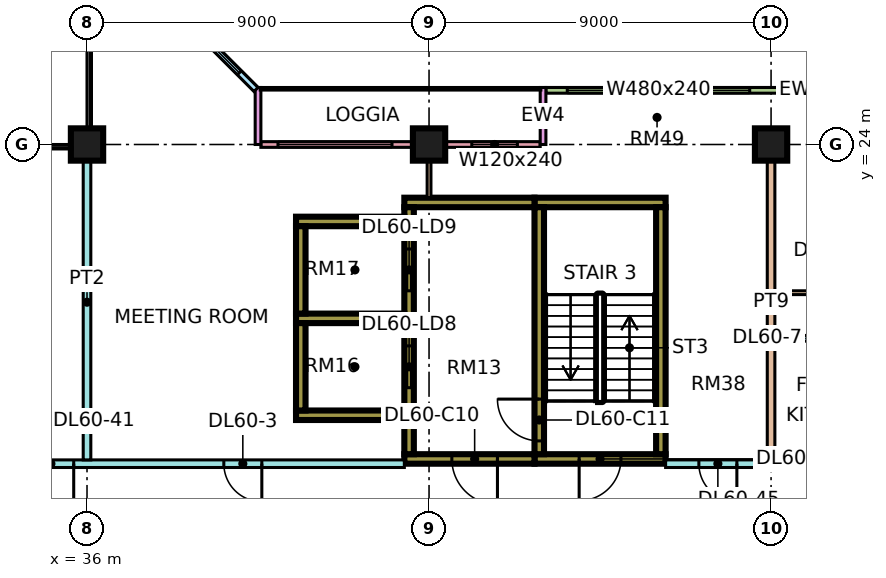
"""IFC4 building model, lengths in metres.
Left out: names, types, materials, properties, quantities, classifications, styles, units other than length and angle.
Written with IfcOpenShell. Run it as: python <this file> out.ifc"""

import sys

from ifc_helpers import new_model, si_unit, direction, frame, frame_2d, origin, origin_2d, place, context, subcontext, project, spatial, rectangle, extrude, element, fill, save


model = new_model("IFC4")
c1 = context("Model", 3, precision=1e-05, world=origin(), true_north=direction((0.0, 1.0)))
c2 = subcontext(c1, "Body", "Model", "MODEL_VIEW")
j1 = project(units=[si_unit("LENGTHUNIT", "METRE"), si_unit("PLANEANGLEUNIT", "RADIAN")], contexts=[c1])
p1 = place(None, origin())
s1 = spatial("IfcSite", under=j1, at=p1, CompositionType="ELEMENT")
p2 = place(p1, origin())
s2 = spatial("IfcBuilding", under=s1, at=p2, CompositionType="ELEMENT")
p3 = place(p2, frame((0.0, 0.0, 252.9)))
s3 = spatial("IfcBuildingStorey", under=s2, at=p3, CompositionType="ELEMENT", Elevation=252.9)
for number, where, z_axis, x_axis in (
    (1, (36.0, 24.0, 0.0), (0.0, 0.0, 1.0), (1.0, 0.0, 0.0)),
    (2, (45.0, 24.0, 0.0), (0.0, 0.0, 1.0), (1.0, 0.0, 0.0)),
    (3, (54.0, 24.0, 0.0), (0.0, 0.0, 1.0), (1.0, 0.0, 0.0)),
):
    element("IfcColumn", number, at=place(p3, frame(where, z_axis=z_axis, x_axis=x_axis)), inside=s3, PredefinedType="COLUMN", context=c2, shape_type="SweptSolid", body=[
        extrude(rectangle(XDim=0.85, YDim=0.85, at=origin_2d()), origin(), (0.0, 0.0, 1.0), 3.75),
    ])
p4 = place(p3, frame((47.775, 15.725, 0.0), z_axis=(0.0, 0.0, 1.0), x_axis=(1.0, 0.0, 0.0)))
e4 = element("IfcWall", 4, at=p4, inside=s3, PredefinedType="SHEAR", context=c2, shape_type="SweptSolid", body=[
    extrude(rectangle(XDim=3.45, YDim=0.25, at=frame_2d((1.725, 0.0))), origin(), (0.0, 0.0, 1.0), 3.75),
])
p5 = place(p4, frame((1.175, 0.0, 0.0)))
e5 = element("IfcOpeningElement", 5, at=p5, cuts=e4, PredefinedType="OPENING", context=c2, shape_type="SweptSolid", body=[
    extrude(rectangle(XDim=1.1, YDim=2.2, at=frame_2d((0.55, 1.1))), frame((0.0, 0.135, 0.0), z_axis=(0.0, -1.0, 0.0), x_axis=(1.0, 0.0, 0.0)), (0.0, 0.0, 1.0), 0.27),
])
p6 = place(p3, frame((47.775, 22.475, 0.0), z_axis=(0.0, 0.0, 1.0), x_axis=(1.0, 0.0, 0.0)))
e6 = element("IfcWall", 6, at=p6, inside=s3, PredefinedType="SHEAR", context=c2, shape_type="SweptSolid", body=[
    extrude(rectangle(XDim=3.45, YDim=0.25, at=frame_2d((1.725, 0.0))), origin(), (0.0, 0.0, 1.0), 3.75),
])
p7 = place(p3, frame((47.9, 15.85, 0.0), z_axis=(0.0, 0.0, 1.0), x_axis=(0.0, 1.0, 0.0)))
e7 = element("IfcWall", 7, at=p7, inside=s3, PredefinedType="SHEAR", context=c2, shape_type="SweptSolid", body=[
    extrude(rectangle(XDim=6.5, YDim=0.25, at=frame_2d((3.25, 0.0))), origin(), (0.0, 0.0, 1.0), 3.75),
])
p8 = place(p7, frame((0.35, 0.0, 0.0)))
e8 = element("IfcOpeningElement", 8, at=p8, cuts=e7, PredefinedType="OPENING", context=c2, shape_type="SweptSolid", body=[
    extrude(rectangle(XDim=1.1, YDim=2.2, at=frame_2d((0.55, 1.1))), frame((0.0, 0.135, 0.0), z_axis=(0.0, -1.0, 0.0), x_axis=(1.0, 0.0, 0.0)), (0.0, 0.0, 1.0), 0.27),
])
p9 = place(p3, frame((51.1, 15.85, 0.0), z_axis=(0.0, 0.0, 1.0), x_axis=(0.0, 1.0, 0.0)))
e9 = element("IfcWall", 9, at=p9, inside=s3, PredefinedType="SHEAR", context=c2, shape_type="SweptSolid", body=[
    extrude(rectangle(XDim=6.5, YDim=0.25, at=frame_2d((3.25, 0.0))), origin(), (0.0, 0.0, 1.0), 3.75),
])
p10 = place(p3, frame((44.35, 15.725, 0.0), z_axis=(0.0, 0.0, 1.0), x_axis=(1.0, 0.0, 0.0)))
e10 = element("IfcWall", 10, at=p10, inside=s3, PredefinedType="SHEAR", context=c2, shape_type="SweptSolid", body=[
    extrude(rectangle(XDim=3.425, YDim=0.25, at=frame_2d((1.712, 0.0))), origin(), (0.0, 0.0, 1.0), 3.75),
])
p11 = place(p10, frame((1.25, 0.0, 0.0)))
e11 = element("IfcOpeningElement", 11, at=p11, cuts=e10, PredefinedType="OPENING", context=c2, shape_type="SweptSolid", body=[
    extrude(rectangle(XDim=1.2, YDim=2.2, at=frame_2d((0.6, 1.1))), frame((0.0, 0.135, 0.0), z_axis=(0.0, -1.0, 0.0), x_axis=(1.0, 0.0, 0.0)), (0.0, 0.0, 1.0), 0.27),
])
p12 = place(p3, frame((44.35, 22.475, 0.0), z_axis=(0.0, 0.0, 1.0), x_axis=(1.0, 0.0, 0.0)))
e12 = element("IfcWall", 12, at=p12, inside=s3, PredefinedType="SHEAR", context=c2, shape_type="SweptSolid", body=[
    extrude(rectangle(XDim=3.425, YDim=0.25, at=frame_2d((1.712, 0.0))), origin(), (0.0, 0.0, 1.0), 3.75),
])
p13 = place(p3, frame((44.475, 15.85, 0.0), z_axis=(0.0, 0.0, 1.0), x_axis=(0.0, 1.0, 0.0)))
e13 = element("IfcWall", 13, at=p13, inside=s3, PredefinedType="SHEAR", context=c2, shape_type="SweptSolid", body=[
    extrude(rectangle(XDim=6.5, YDim=0.25, at=frame_2d((3.25, 0.0))), origin(), (0.0, 0.0, 1.0), 3.75),
])
p14 = place(p13, frame((1.75, 0.0, 0.0)))
e14 = element("IfcOpeningElement", 14, at=p14, cuts=e13, PredefinedType="OPENING", context=c2, shape_type="SweptSolid", body=[
    extrude(rectangle(XDim=1.1, YDim=2.2, at=frame_2d((0.55, 1.1))), frame((0.0, 0.135, 0.0), z_axis=(0.0, -1.0, 0.0), x_axis=(1.0, 0.0, 0.0)), (0.0, 0.0, 1.0), 0.27),
])
p15 = place(p13, frame((4.3, 0.0, 0.0)))
e15 = element("IfcOpeningElement", 15, at=p15, cuts=e13, PredefinedType="OPENING", context=c2, shape_type="SweptSolid", body=[
    extrude(rectangle(XDim=1.1, YDim=2.2, at=frame_2d((0.55, 1.1))), frame((0.0, 0.135, 0.0), z_axis=(0.0, -1.0, 0.0), x_axis=(1.0, 0.0, 0.0)), (0.0, 0.0, 1.0), 0.27),
])
for number, where, z_axis, x_axis in (
    (16, (41.5, 16.875, 0.0), (0.0, 0.0, 1.0), (1.0, 0.0, 0.0)),
    (17, (41.5, 19.425, 0.0), (0.0, 0.0, 1.0), (1.0, 0.0, 0.0)),
    (18, (41.5, 21.975, 0.0), (0.0, 0.0, 1.0), (1.0, 0.0, 0.0)),
):
    element("IfcWall", number, at=place(p3, frame(where, z_axis=z_axis, x_axis=x_axis)), inside=s3, PredefinedType="SHEAR", context=c2, shape_type="SweptSolid", body=[
        extrude(rectangle(XDim=2.85, YDim=0.25, at=frame_2d((1.425, 0.0))), origin(), (0.0, 0.0, 1.0), 3.75),
    ])
for number, where, z_axis, x_axis in (
    (19, (41.625, 17.0, 0.0), (0.0, 0.0, 1.0), (0.0, 1.0, 0.0)),
    (20, (41.625, 19.55, 0.0), (0.0, 0.0, 1.0), (0.0, 1.0, 0.0)),
):
    element("IfcWall", number, at=place(p3, frame(where, z_axis=z_axis, x_axis=x_axis)), inside=s3, PredefinedType="SHEAR", context=c2, shape_type="SweptSolid", body=[
        extrude(rectangle(XDim=2.3, YDim=0.25, at=frame_2d((1.15, 0.0))), origin(), (0.0, 0.0, 1.0), 3.75),
    ])
p16 = place(p3, frame((61.5, 25.425, 0.0), z_axis=(0.0, 0.0, 1.0), x_axis=(-1.0, 0.0, 0.0)))
e21 = element("IfcWall", 21, at=p16, inside=s3, PredefinedType="SOLIDWALL", context=c2, shape_type="SweptSolid", body=[
    extrude(rectangle(XDim=13.425, YDim=0.15, at=frame_2d((6.712, 0.0))), origin(), (0.0, 0.0, 1.0), 3.3),
])
p17 = place(p16, frame((0.3, 0.0, 0.45)))
e22 = element("IfcOpeningElement", 22, at=p17, cuts=e21, PredefinedType="OPENING", context=c2, shape_type="SweptSolid", body=[
    extrude(rectangle(XDim=0.9, YDim=2.4, at=frame_2d((0.45, 1.2))), frame((0.0, 0.085, 0.0), z_axis=(0.0, -1.0, 0.0), x_axis=(1.0, 0.0, 0.0)), (0.0, 0.0, 1.0), 0.17),
])
p18 = place(p16, frame((2.1, 0.0, 0.45)))
e23 = element("IfcOpeningElement", 23, at=p18, cuts=e21, PredefinedType="OPENING", context=c2, shape_type="SweptSolid", body=[
    extrude(rectangle(XDim=1.8, YDim=2.4, at=frame_2d((0.9, 1.2))), frame((0.0, 0.085, 0.0), z_axis=(0.0, -1.0, 0.0), x_axis=(1.0, 0.0, 0.0)), (0.0, 0.0, 1.0), 0.17),
])
p19 = place(p16, frame((5.1, 0.0, 0.45)))
e24 = element("IfcOpeningElement", 24, at=p19, cuts=e21, PredefinedType="OPENING", context=c2, shape_type="SweptSolid", body=[
    extrude(rectangle(XDim=1.8, YDim=2.4, at=frame_2d((0.9, 1.2))), frame((0.0, 0.085, 0.0), z_axis=(0.0, -1.0, 0.0), x_axis=(1.0, 0.0, 0.0)), (0.0, 0.0, 1.0), 0.17),
])
p20 = place(p16, frame((8.062, 0.0, 0.45)))
e25 = element("IfcOpeningElement", 25, at=p20, cuts=e21, PredefinedType="OPENING", context=c2, shape_type="SweptSolid", body=[
    extrude(rectangle(XDim=4.8, YDim=2.4, at=frame_2d((2.4, 1.2))), frame((0.0, 0.085, 0.0), z_axis=(0.0, -1.0, 0.0), x_axis=(1.0, 0.0, 0.0)), (0.0, 0.0, 1.0), 0.17),
])
p21 = place(p3, frame((47.925, 24.0, 0.0), z_axis=(0.0, 0.0, 1.0), x_axis=(-1.0, 0.0, 0.0)))
e26 = element("IfcWall", 26, at=p21, inside=s3, PredefinedType="SOLIDWALL", context=c2, shape_type="SweptSolid", body=[
    extrude(rectangle(XDim=7.35, YDim=0.15, at=frame_2d((3.675, 0.0))), origin(), (0.0, 0.0, 1.0), 3.3),
])
p22 = place(p21, frame((0.6, 0.0, 0.45)))
e27 = element("IfcOpeningElement", 27, at=p22, cuts=e26, PredefinedType="OPENING", context=c2, shape_type="SweptSolid", body=[
    extrude(rectangle(XDim=1.2, YDim=2.4, at=frame_2d((0.6, 1.2))), frame((0.0, 0.085, 0.0), z_axis=(0.0, -1.0, 0.0), x_axis=(1.0, 0.0, 0.0)), (0.0, 0.0, 1.0), 0.17),
])
p23 = place(p21, frame((3.9, 0.0, 0.45)))
e28 = element("IfcOpeningElement", 28, at=p23, cuts=e26, PredefinedType="OPENING", context=c2, shape_type="SweptSolid", body=[
    extrude(rectangle(XDim=3.0, YDim=2.4, at=frame_2d((1.5, 1.2))), frame((0.0, 0.085, 0.0), z_axis=(0.0, -1.0, 0.0), x_axis=(1.0, 0.0, 0.0)), (0.0, 0.0, 1.0), 0.17),
])
for number, where, z_axis, x_axis in (
    (29, (48.0, 25.5, 0.0), (0.0, 0.0, 1.0), (0.0, -1.0, 0.0)),
    (30, (40.5, 25.5, 0.0), (0.0, 0.0, 1.0), (0.0, -1.0, 0.0)),
):
    element("IfcWall", number, at=place(p3, frame(where, z_axis=z_axis, x_axis=x_axis)), inside=s3, PredefinedType="SOLIDWALL", context=c2, shape_type="SweptSolid", body=[
        extrude(rectangle(XDim=1.5, YDim=0.15, at=frame_2d((0.75, 0.0))), origin(), (0.0, 0.0, 1.0), 3.3),
    ])
p24 = place(p3, frame((40.447, 25.447, 0.0), z_axis=(0.0, 0.0, 1.0), x_axis=(-0.707106781187, 0.707106781187, 0.0)))
e31 = element("IfcWall", 31, at=p24, inside=s3, PredefinedType="SOLIDWALL", context=c2, shape_type="SweptSolid", body=[
    extrude(rectangle(XDim=4.243, YDim=0.15, at=frame_2d((2.121, 0.0))), origin(), (0.0, 0.0, 1.0), 3.3),
])
p25 = place(p24, frame((0.621, 0.0, 0.45)))
e32 = element("IfcOpeningElement", 32, at=p25, cuts=e31, PredefinedType="OPENING", context=c2, shape_type="SweptSolid", body=[
    extrude(rectangle(XDim=3.0, YDim=2.4, at=frame_2d((1.5, 1.2))), frame((0.0, 0.085, 0.0), z_axis=(0.0, -1.0, 0.0), x_axis=(1.0, 0.0, 0.0)), (0.0, 0.0, 1.0), 0.17),
])
p26 = place(p3, frame((34.0, 15.6, 0.0), z_axis=(0.0, 0.0, 1.0), x_axis=(1.0, 0.0, 0.0)))
e33 = element("IfcWall", 33, at=p26, inside=s3, PredefinedType="PARTITIONING", context=c2, shape_type="SweptSolid", body=[
    extrude(rectangle(XDim=10.35, YDim=0.2, at=frame_2d((5.175, 0.0))), origin(), (0.0, 0.0, 1.0), 3.3),
])
p27 = place(p26, frame((5.6, 0.0, 0.0)))
e34 = element("IfcOpeningElement", 34, at=p27, cuts=e33, PredefinedType="OPENING", context=c2, shape_type="SweptSolid", body=[
    extrude(rectangle(XDim=1.0, YDim=2.1, at=frame_2d((0.5, 1.05))), frame((0.0, 0.11, 0.0), z_axis=(0.0, -1.0, 0.0), x_axis=(1.0, 0.0, 0.0)), (0.0, 0.0, 1.0), 0.22),
])
p28 = place(p26, frame((0.45, 0.0, 0.0)))
e35 = element("IfcOpeningElement", 35, at=p28, cuts=e33, PredefinedType="OPENING", context=c2, shape_type="SweptSolid", body=[
    extrude(rectangle(XDim=1.2, YDim=2.1, at=frame_2d((0.6, 1.05))), frame((0.0, 0.11, 0.0), z_axis=(0.0, -1.0, 0.0), x_axis=(1.0, 0.0, 0.0)), (0.0, 0.0, 1.0), 0.22),
])
p29 = place(p3, frame((36.0, 15.7, 0.0), z_axis=(0.0, 0.0, 1.0), x_axis=(0.0, 1.0, 0.0)))
e36 = element("IfcWall", 36, at=p29, inside=s3, PredefinedType="PARTITIONING", context=c2, shape_type="SweptSolid", body=[
    extrude(rectangle(XDim=8.3, YDim=0.2, at=frame_2d((4.15, 0.0))), origin(), (0.0, 0.0, 1.0), 3.3),
])
p30 = place(p3, frame((45.0, 22.6, 0.0), z_axis=(0.0, 0.0, 1.0), x_axis=(0.0, 1.0, 0.0)))
e37 = element("IfcWall", 37, at=p30, inside=s3, PredefinedType="PARTITIONING", context=c2, shape_type="SweptSolid", body=[
    extrude(rectangle(XDim=1.326, YDim=0.1, at=frame_2d((0.663, 0.0))), origin(), (0.0, 0.0, 1.0), 3.3),
])
p31 = place(p3, frame((51.225, 15.6, 0.0), z_axis=(0.0, 0.0, 1.0), x_axis=(1.0, 0.0, 0.0)))
e38 = element("IfcWall", 38, at=p31, inside=s3, PredefinedType="PARTITIONING", context=c2, shape_type="SweptSolid", body=[
    extrude(rectangle(XDim=11.701, YDim=0.2, at=frame_2d((5.851, 0.0))), origin(), (0.0, 0.0, 1.0), 3.3),
])
p32 = place(p31, frame((9.425, 0.0, 0.0)))
e39 = element("IfcOpeningElement", 39, at=p32, cuts=e38, PredefinedType="OPENING", context=c2, shape_type="SweptSolid", body=[
    extrude(rectangle(XDim=1.0, YDim=2.1, at=frame_2d((0.5, 1.05))), frame((0.0, 0.11, 0.0), z_axis=(0.0, -1.0, 0.0), x_axis=(1.0, 0.0, 0.0)), (0.0, 0.0, 1.0), 0.22),
])
p33 = place(p31, frame((0.875, 0.0, 0.0)))
e40 = element("IfcOpeningElement", 40, at=p33, cuts=e38, PredefinedType="OPENING", context=c2, shape_type="SweptSolid", body=[
    extrude(rectangle(XDim=1.0, YDim=2.1, at=frame_2d((0.5, 1.05))), frame((0.0, 0.11, 0.0), z_axis=(0.0, -1.0, 0.0), x_axis=(1.0, 0.0, 0.0)), (0.0, 0.0, 1.0), 0.22),
])
p34 = place(p3, frame((54.0, 15.7, 0.0), z_axis=(0.0, 0.0, 1.0), x_axis=(0.0, 1.0, 0.0)))
e41 = element("IfcWall", 41, at=p34, inside=s3, PredefinedType="PARTITIONING", context=c2, shape_type="SweptSolid", body=[
    extrude(rectangle(XDim=8.3, YDim=0.2, at=frame_2d((4.15, 0.0))), origin(), (0.0, 0.0, 1.0), 3.3),
])
p35 = place(p3, frame((54.1, 18.9, 0.0), z_axis=(0.0, 0.0, 1.0), x_axis=(1.0, 0.0, 0.0)))
e42 = element("IfcWall", 42, at=p35, inside=s3, PredefinedType="PARTITIONING", context=c2, shape_type="SweptSolid", body=[
    extrude(rectangle(XDim=5.375, YDim=0.15, at=frame_2d((2.688, 0.0))), origin(), (0.0, 0.0, 1.0), 3.3),
])
p36 = place(p35, frame((3.65, 0.0, 0.0)))
e43 = element("IfcOpeningElement", 43, at=p36, cuts=e42, PredefinedType="OPENING", context=c2, shape_type="SweptSolid", body=[
    extrude(rectangle(XDim=0.8, YDim=2.1, at=frame_2d((0.4, 1.05))), frame((0.0, 0.085, 0.0), z_axis=(0.0, -1.0, 0.0), x_axis=(1.0, 0.0, 0.0)), (0.0, 0.0, 1.0), 0.17),
])
p37 = place(p35, frame((0.95, 0.0, 0.0)))
e44 = element("IfcOpeningElement", 44, at=p37, cuts=e42, PredefinedType="OPENING", context=c2, shape_type="SweptSolid", body=[
    extrude(rectangle(XDim=0.9, YDim=2.1, at=frame_2d((0.45, 1.05))), frame((0.0, 0.085, 0.0), z_axis=(0.0, -1.0, 0.0), x_axis=(1.0, 0.0, 0.0)), (0.0, 0.0, 1.0), 0.17),
])
p38 = place(p3, frame((54.1, 20.1, 0.0), z_axis=(0.0, 0.0, 1.0), x_axis=(1.0, 0.0, 0.0)))
e45 = element("IfcWall", 45, at=p38, inside=s3, PredefinedType="PARTITIONING", context=c2, shape_type="SweptSolid", body=[
    extrude(rectangle(XDim=2.85, YDim=0.1, at=frame_2d((1.425, 0.0))), origin(), (0.0, 0.0, 1.0), 3.3),
])
p39 = place(p38, frame((0.95, 0.0, 0.0)))
e46 = element("IfcOpeningElement", 46, at=p39, cuts=e45, PredefinedType="OPENING", context=c2, shape_type="SweptSolid", body=[
    extrude(rectangle(XDim=0.9, YDim=2.1, at=frame_2d((0.45, 1.05))), frame((0.0, 0.06, 0.0), z_axis=(0.0, -1.0, 0.0), x_axis=(1.0, 0.0, 0.0)), (0.0, 0.0, 1.0), 0.12),
])
p40 = place(p19, origin())
e47 = element("IfcWindow", 47, at=p40, inside=s3, PartitioningType="SINGLE_PANEL", PredefinedType="WINDOW", context=c2, shape_type="SweptSolid", body=[
    extrude(rectangle(XDim=1.8, YDim=2.4, at=frame_2d((0.9, 1.2))), frame((0.0, 0.03, 0.0), z_axis=(0.0, -1.0, 0.0), x_axis=(1.0, 0.0, 0.0)), (0.0, 0.0, 1.0), 0.06),
])
fill(e24, e47)
p41 = place(p20, origin())
e48 = element("IfcWindow", 48, at=p41, inside=s3, PartitioningType="SINGLE_PANEL", PredefinedType="WINDOW", context=c2, shape_type="SweptSolid", body=[
    extrude(rectangle(XDim=4.8, YDim=2.4, at=frame_2d((2.4, 1.2))), frame((0.0, 0.03, 0.0), z_axis=(0.0, -1.0, 0.0), x_axis=(1.0, 0.0, 0.0)), (0.0, 0.0, 1.0), 0.06),
])
fill(e25, e48)
p42 = place(p22, origin())
e49 = element("IfcWindow", 49, at=p42, inside=s3, PartitioningType="SINGLE_PANEL", PredefinedType="WINDOW", context=c2, shape_type="SweptSolid", body=[
    extrude(rectangle(XDim=1.2, YDim=2.4, at=frame_2d((0.6, 1.2))), frame((0.0, 0.03, 0.0), z_axis=(0.0, -1.0, 0.0), x_axis=(1.0, 0.0, 0.0)), (0.0, 0.0, 1.0), 0.06),
])
fill(e27, e49)
p43 = place(p23, origin())
e50 = element("IfcWindow", 50, at=p43, inside=s3, PartitioningType="SINGLE_PANEL", PredefinedType="WINDOW", context=c2, shape_type="SweptSolid", body=[
    extrude(rectangle(XDim=3.0, YDim=2.4, at=frame_2d((1.5, 1.2))), frame((0.0, 0.03, 0.0), z_axis=(0.0, -1.0, 0.0), x_axis=(1.0, 0.0, 0.0)), (0.0, 0.0, 1.0), 0.06),
])
fill(e28, e50)
p44 = place(p25, origin())
e51 = element("IfcWindow", 51, at=p44, inside=s3, PartitioningType="SINGLE_PANEL", PredefinedType="WINDOW", context=c2, shape_type="SweptSolid", body=[
    extrude(rectangle(XDim=3.0, YDim=2.4, at=frame_2d((1.5, 1.2))), frame((0.0, 0.03, 0.0), z_axis=(0.0, -1.0, 0.0), x_axis=(1.0, 0.0, 0.0)), (0.0, 0.0, 1.0), 0.06),
])
fill(e32, e51)
p45 = place(p5, frame((1.1, 0.0, 0.0), z_axis=(0.0, 0.0, 1.0), x_axis=(-1.0, 0.0, 0.0)))
e52 = element("IfcDoor", 52, at=p45, inside=s3, OperationType="SINGLE_SWING_LEFT", PredefinedType="DOOR", context=c2, shape_type="SweptSolid", body=[
    extrude(rectangle(XDim=1.1, YDim=2.2, at=frame_2d((0.55, 1.1))), frame((0.0, 0.025, 0.0), z_axis=(0.0, -1.0, 0.0), x_axis=(1.0, 0.0, 0.0)), (0.0, 0.0, 1.0), 0.05),
])
fill(e5, e52)
p46 = place(p11, origin())
e53 = element("IfcDoor", 53, at=p46, inside=s3, OperationType="SINGLE_SWING_RIGHT", PredefinedType="DOOR", context=c2, shape_type="SweptSolid", body=[
    extrude(rectangle(XDim=1.2, YDim=2.2, at=frame_2d((0.6, 1.1))), frame((0.0, 0.025, 0.0), z_axis=(0.0, -1.0, 0.0), x_axis=(1.0, 0.0, 0.0)), (0.0, 0.0, 1.0), 0.05),
])
fill(e11, e53)
p47 = place(p8, frame((1.1, 0.0, 0.0), z_axis=(0.0, 0.0, 1.0), x_axis=(-1.0, 0.0, 0.0)))
e54 = element("IfcDoor", 54, at=p47, inside=s3, OperationType="SINGLE_SWING_RIGHT", PredefinedType="DOOR", context=c2, shape_type="SweptSolid", body=[
    extrude(rectangle(XDim=1.1, YDim=2.2, at=frame_2d((0.55, 1.1))), frame((0.0, 0.025, 0.0), z_axis=(0.0, -1.0, 0.0), x_axis=(1.0, 0.0, 0.0)), (0.0, 0.0, 1.0), 0.05),
])
fill(e8, e54)
p48 = place(p14, origin())
e55 = element("IfcDoor", 55, at=p48, inside=s3, OperationType="DOUBLE_DOOR_SLIDING", PredefinedType="DOOR", context=c2, shape_type="SweptSolid", body=[
    extrude(rectangle(XDim=1.1, YDim=2.2, at=frame_2d((0.55, 1.1))), frame((0.0, 0.025, 0.0), z_axis=(0.0, -1.0, 0.0), x_axis=(1.0, 0.0, 0.0)), (0.0, 0.0, 1.0), 0.05),
])
fill(e14, e55)
p49 = place(p15, origin())
e56 = element("IfcDoor", 56, at=p49, inside=s3, OperationType="DOUBLE_DOOR_SLIDING", PredefinedType="DOOR", context=c2, shape_type="SweptSolid", body=[
    extrude(rectangle(XDim=1.1, YDim=2.2, at=frame_2d((0.55, 1.1))), frame((0.0, 0.025, 0.0), z_axis=(0.0, -1.0, 0.0), x_axis=(1.0, 0.0, 0.0)), (0.0, 0.0, 1.0), 0.05),
])
fill(e15, e56)
p50 = place(p27, origin())
e57 = element("IfcDoor", 57, at=p50, inside=s3, OperationType="SINGLE_SWING_RIGHT", PredefinedType="DOOR", context=c2, shape_type="SweptSolid", body=[
    extrude(rectangle(XDim=1.0, YDim=2.1, at=frame_2d((0.5, 1.05))), frame((0.0, 0.025, 0.0), z_axis=(0.0, -1.0, 0.0), x_axis=(1.0, 0.0, 0.0)), (0.0, 0.0, 1.0), 0.05),
])
fill(e34, e57)
p51 = place(p28, origin())
e58 = element("IfcDoor", 58, at=p51, inside=s3, OperationType="SINGLE_SWING_RIGHT", PredefinedType="DOOR", context=c2, shape_type="SweptSolid", body=[
    extrude(rectangle(XDim=1.2, YDim=2.1, at=frame_2d((0.6, 1.05))), frame((0.0, 0.025, 0.0), z_axis=(0.0, -1.0, 0.0), x_axis=(1.0, 0.0, 0.0)), (0.0, 0.0, 1.0), 0.05),
])
fill(e35, e58)
p52 = place(p33, origin())
e59 = element("IfcDoor", 59, at=p52, inside=s3, OperationType="SINGLE_SWING_RIGHT", PredefinedType="DOOR", context=c2, shape_type="SweptSolid", body=[
    extrude(rectangle(XDim=1.0, YDim=2.1, at=frame_2d((0.5, 1.05))), frame((0.0, 0.025, 0.0), z_axis=(0.0, -1.0, 0.0), x_axis=(1.0, 0.0, 0.0)), (0.0, 0.0, 1.0), 0.05),
])
fill(e40, e59)
save(model, sys.argv[1])
